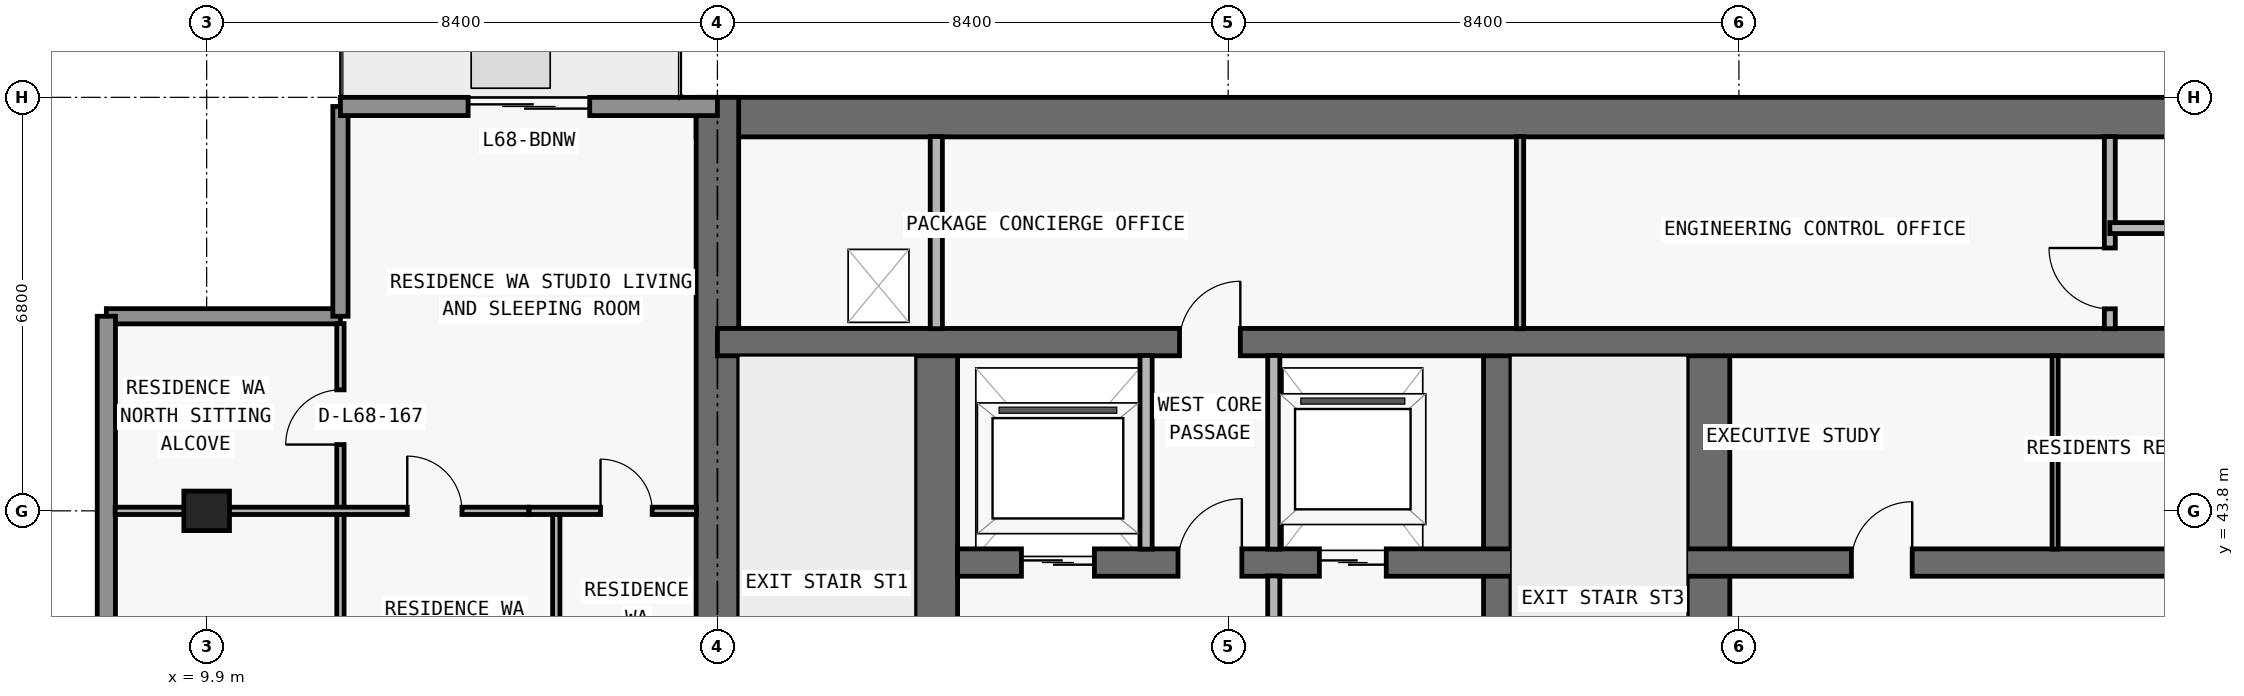
"""IFC4 building model, lengths in metres.
Left out: names, types, materials, properties, quantities, classifications, styles, units other than length and angle.
Written with IfcOpenShell. Run it as: python <this file> out.ifc"""

import sys

from ifc_helpers import new_model, si_unit, direction, frame, frame_2d, origin, origin_2d, place, context, subcontext, project, spatial, rectangle, extrude, element, fill, save


model = new_model("IFC4")
c1 = context("Model", 3, precision=1e-05, world=origin(), true_north=direction((0.0, 1.0)))
c2 = subcontext(c1, "Body", "Model", "MODEL_VIEW")
j1 = project(units=[si_unit("LENGTHUNIT", "METRE"), si_unit("PLANEANGLEUNIT", "RADIAN")], contexts=[c1])
p1 = place(None, origin())
s1 = spatial("IfcSite", under=j1, at=p1, CompositionType="ELEMENT")
p2 = place(p1, origin())
s2 = spatial("IfcBuilding", under=s1, at=p2, CompositionType="ELEMENT")
p3 = place(p2, frame((0.0, 0.0, 243.0)))
s3 = spatial("IfcBuildingStorey", under=s2, at=p3, CompositionType="ELEMENT", Elevation=243.0)
p4 = place(p3, frame((9.9, 43.8, 0.0), z_axis=(0.0, 0.0, 1.0), x_axis=(1.0, 0.0, 0.0)))
e1 = element("IfcColumn", 1, at=p4, inside=s3, PredefinedType="COLUMN", context=c2, shape_type="SweptSolid", body=[
    extrude(rectangle(XDim=0.75, YDim=0.65, at=origin_2d()), origin(), (0.0, 0.0, 1.0), 3.05),
])
p5 = place(p3, frame((17.95, 50.275, 0.0), z_axis=(0.0, 0.0, 1.0), x_axis=(1.0, 0.0, 0.0)))
e2 = element("IfcWall", 2, at=p5, inside=s3, PredefinedType="SHEAR", context=c2, shape_type="SweptSolid", body=[
    extrude(rectangle(XDim=41.9, YDim=0.65, at=frame_2d((20.95, 0.0))), origin(), (0.0, 0.0, 1.0), 3.05),
])
p6 = place(p3, frame((18.3, 36.65, 0.0), z_axis=(0.0, 0.0, 1.0), x_axis=(0.0, 1.0, 0.0)))
e3 = element("IfcWall", 3, at=p6, inside=s3, PredefinedType="SHEAR", context=c2, shape_type="SweptSolid", body=[
    extrude(rectangle(XDim=13.95, YDim=0.7, at=frame_2d((6.975, 0.0))), origin(), (0.0, 0.0, 1.0), 3.05),
])
p7 = place(p3, frame((21.9, 37.0, 0.0), z_axis=(0.0, 0.0, 1.0), x_axis=(0.0, 1.0, 0.0)))
e4 = element("IfcWall", 4, at=p7, inside=s3, PredefinedType="SHEAR", context=c2, shape_type="SweptSolid", body=[
    extrude(rectangle(XDim=9.575, YDim=0.7, at=frame_2d((4.788, 0.0))), origin(), (0.0, 0.0, 1.0), 3.05),
])
p8 = place(p7, frame((0.55, 0.0, 0.0)))
e5 = element("IfcOpeningElement", 5, at=p8, cuts=e4, PredefinedType="OPENING", context=c2, shape_type="SweptSolid", body=[
    extrude(rectangle(XDim=1.1, YDim=2.15, at=frame_2d((0.55, 1.075))), frame((0.0, 0.36, 0.0), z_axis=(0.0, -1.0, 0.0), x_axis=(1.0, 0.0, 0.0)), (0.0, 0.0, 1.0), 0.72),
])
p9 = place(p3, frame((31.125, 37.0, 0.0), z_axis=(0.0, 0.0, 1.0), x_axis=(0.0, 1.0, 0.0)))
e6 = element("IfcWall", 6, at=p9, inside=s3, PredefinedType="SHEAR", context=c2, shape_type="SweptSolid", body=[
    extrude(rectangle(XDim=9.575, YDim=0.45, at=frame_2d((4.788, 0.0))), origin(), (0.0, 0.0, 1.0), 3.05),
])
p10 = place(p3, frame((34.6, 37.0, 0.0), z_axis=(0.0, 0.0, 1.0), x_axis=(0.0, 1.0, 0.0)))
e7 = element("IfcWall", 7, at=p10, inside=s3, PredefinedType="SHEAR", context=c2, shape_type="SweptSolid", body=[
    extrude(rectangle(XDim=9.575, YDim=0.7, at=frame_2d((4.788, 0.0))), origin(), (0.0, 0.0, 1.0), 3.05),
])
p11 = place(p3, frame((22.25, 42.95, 0.0), z_axis=(0.0, 0.0, 1.0), x_axis=(1.0, 0.0, 0.0)))
e8 = element("IfcWall", 8, at=p11, inside=s3, PredefinedType="SHEAR", context=c2, shape_type="SweptSolid", body=[
    extrude(rectangle(XDim=33.3, YDim=0.45, at=frame_2d((16.65, 0.0))), origin(), (0.0, 0.0, 1.0), 3.05),
])
p12 = place(p11, frame((1.05, 0.0, 0.0)))
e9 = element("IfcOpeningElement", 9, at=p12, cuts=e8, PredefinedType="OPENING", context=c2, shape_type="SweptSolid", body=[
    extrude(rectangle(XDim=1.2, YDim=2.2, at=frame_2d((0.6, 1.1))), frame((0.0, 0.235, 0.0), z_axis=(0.0, -1.0, 0.0), x_axis=(1.0, 0.0, 0.0)), (0.0, 0.0, 1.0), 0.47),
])
p13 = place(p11, frame((31.05, 0.0, 0.0)))
e10 = element("IfcOpeningElement", 10, at=p13, cuts=e8, PredefinedType="OPENING", context=c2, shape_type="SweptSolid", body=[
    extrude(rectangle(XDim=1.2, YDim=2.2, at=frame_2d((0.6, 1.1))), frame((0.0, 0.235, 0.0), z_axis=(0.0, -1.0, 0.0), x_axis=(1.0, 0.0, 0.0)), (0.0, 0.0, 1.0), 0.47),
])
p14 = place(p11, frame((26.45, 0.0, 0.0)))
e11 = element("IfcOpeningElement", 11, at=p14, cuts=e8, PredefinedType="OPENING", context=c2, shape_type="SweptSolid", body=[
    extrude(rectangle(XDim=1.1, YDim=2.2, at=frame_2d((0.55, 1.1))), frame((0.0, 0.235, 0.0), z_axis=(0.0, -1.0, 0.0), x_axis=(1.0, 0.0, 0.0)), (0.0, 0.0, 1.0), 0.47),
])
p15 = place(p11, frame((5.95, 0.0, 0.0)))
e12 = element("IfcOpeningElement", 12, at=p15, cuts=e8, PredefinedType="OPENING", context=c2, shape_type="SweptSolid", body=[
    extrude(rectangle(XDim=1.1, YDim=2.2, at=frame_2d((0.55, 1.1))), frame((0.0, 0.235, 0.0), z_axis=(0.0, -1.0, 0.0), x_axis=(1.0, 0.0, 0.0)), (0.0, 0.0, 1.0), 0.47),
])
p16 = place(p11, frame((3.625, 0.0, 0.0)))
e13 = element("IfcOpeningElement", 13, at=p16, cuts=e8, PredefinedType="OPENING", context=c2, shape_type="SweptSolid", body=[
    extrude(rectangle(XDim=1.05, YDim=2.15, at=frame_2d((0.525, 1.075))), frame((0.0, 0.235, 0.0), z_axis=(0.0, -1.0, 0.0), x_axis=(1.0, 0.0, 0.0)), (0.0, 0.0, 1.0), 0.47),
])
p17 = place(p11, frame((28.675, 0.0, 0.0)))
e14 = element("IfcOpeningElement", 14, at=p17, cuts=e8, PredefinedType="OPENING", context=c2, shape_type="SweptSolid", body=[
    extrude(rectangle(XDim=1.05, YDim=2.15, at=frame_2d((0.525, 1.075))), frame((0.0, 0.235, 0.0), z_axis=(0.0, -1.0, 0.0), x_axis=(1.0, 0.0, 0.0)), (0.0, 0.0, 1.0), 0.47),
])
p18 = place(p11, frame((14.7, 0.0, 0.0)))
e15 = element("IfcOpeningElement", 15, at=p18, cuts=e8, PredefinedType="OPENING", context=c2, shape_type="SweptSolid", body=[
    extrude(rectangle(XDim=1.0, YDim=2.2, at=frame_2d((0.5, 1.1))), frame((0.0, 0.235, 0.0), z_axis=(0.0, -1.0, 0.0), x_axis=(1.0, 0.0, 0.0)), (0.0, 0.0, 1.0), 0.47),
])
p19 = place(p11, frame((21.45, 0.0, 0.0)))
e16 = element("IfcOpeningElement", 16, at=p19, cuts=e8, PredefinedType="OPENING", context=c2, shape_type="SweptSolid", body=[
    extrude(rectangle(XDim=1.0, YDim=2.2, at=frame_2d((0.5, 1.1))), frame((0.0, 0.235, 0.0), z_axis=(0.0, -1.0, 0.0), x_axis=(1.0, 0.0, 0.0)), (0.0, 0.0, 1.0), 0.47),
])
p20 = place(p3, frame((18.3, 46.575, 0.0), z_axis=(0.0, 0.0, 1.0), x_axis=(1.0, 0.0, 0.0)))
e17 = element("IfcWall", 17, at=p20, inside=s3, PredefinedType="SHEAR", context=c2, shape_type="SweptSolid", body=[
    extrude(rectangle(XDim=41.2, YDim=0.45, at=frame_2d((20.6, 0.0))), origin(), (0.0, 0.0, 1.0), 3.05),
])
p21 = place(p20, frame((7.6, 0.0, 0.0)))
e18 = element("IfcOpeningElement", 18, at=p21, cuts=e17, PredefinedType="OPENING", context=c2, shape_type="SweptSolid", body=[
    extrude(rectangle(XDim=1.0, YDim=2.2, at=frame_2d((0.5, 1.1))), frame((0.0, 0.235, 0.0), z_axis=(0.0, -1.0, 0.0), x_axis=(1.0, 0.0, 0.0)), (0.0, 0.0, 1.0), 0.47),
])
p22 = place(p20, frame((32.625, 0.0, 0.0)))
e19 = element("IfcOpeningElement", 19, at=p22, cuts=e17, PredefinedType="OPENING", context=c2, shape_type="SweptSolid", body=[
    extrude(rectangle(XDim=1.05, YDim=2.15, at=frame_2d((0.525, 1.075))), frame((0.0, 0.235, 0.0), z_axis=(0.0, -1.0, 0.0), x_axis=(1.0, 0.0, 0.0)), (0.0, 0.0, 1.0), 0.47),
])
p23 = place(p3, frame((8.25, 47.0, 0.0), z_axis=(0.0, 0.0, 1.0), x_axis=(1.0, 0.0, 0.0)))
e20 = element("IfcWall", 20, at=p23, inside=s3, PredefinedType="ELEMENTEDWALL", context=c2, shape_type="SweptSolid", body=[
    extrude(rectangle(XDim=3.85, YDim=0.25, at=frame_2d((1.925, 0.0))), origin(), (0.0, 0.0, 1.0), 3.05),
])
p24 = place(p3, frame((12.1, 47.0, 0.0), z_axis=(0.0, 0.0, 1.0), x_axis=(0.0, 1.0, 0.0)))
e21 = element("IfcWall", 21, at=p24, inside=s3, PredefinedType="ELEMENTEDWALL", context=c2, shape_type="SweptSolid", body=[
    extrude(rectangle(XDim=3.45, YDim=0.25, at=frame_2d((1.725, 0.0))), origin(), (0.0, 0.0, 1.0), 3.05),
])
p25 = place(p3, frame((8.25, 30.15, 0.0), z_axis=(0.0, 0.0, 1.0), x_axis=(0.0, 1.0, 0.0)))
e22 = element("IfcWall", 22, at=p25, inside=s3, PredefinedType="STANDARD", context=c2, shape_type="SweptSolid", body=[
    extrude(rectangle(XDim=16.85, YDim=0.3, at=frame_2d((8.425, 0.0))), origin(), (0.0, 0.0, 1.0), 3.05),
])
p26 = place(p3, frame((12.1, 50.45, 0.0), z_axis=(0.0, 0.0, 1.0), x_axis=(1.0, 0.0, 0.0)))
e23 = element("IfcWall", 23, at=p26, inside=s3, PredefinedType="STANDARD", context=c2, shape_type="SweptSolid", body=[
    extrude(rectangle(XDim=6.2, YDim=0.3, at=frame_2d((3.1, 0.0))), origin(), (0.0, 0.0, 1.0), 3.05),
])
p27 = place(p26, frame((2.1, 0.0, 0.0)))
e24 = element("IfcOpeningElement", 24, at=p27, cuts=e23, PredefinedType="OPENING", context=c2, shape_type="SweptSolid", body=[
    extrude(rectangle(XDim=2.0, YDim=2.3, at=frame_2d((1.0, 1.15))), frame((0.0, 0.16, 0.0), z_axis=(0.0, -1.0, 0.0), x_axis=(1.0, 0.0, 0.0)), (0.0, 0.0, 1.0), 0.32),
])
p28 = place(p3, frame((12.1, 37.005, 0.0), z_axis=(0.0, 0.0, 1.0), x_axis=(0.0, 1.0, 0.0)))
e25 = element("IfcWall", 25, at=p28, inside=s3, PredefinedType="PARTITIONING", context=c2, shape_type="SweptSolid", body=[
    extrude(rectangle(XDim=9.875, YDim=0.12, at=frame_2d((4.938, 0.0))), origin(), (0.0, 0.0, 1.0), 3.05),
])
p29 = place(p28, frame((2.948, 0.0, 0.0)))
e26 = element("IfcOpeningElement", 26, at=p29, cuts=e25, PredefinedType="OPENING", context=c2, shape_type="SweptSolid", body=[
    extrude(rectangle(XDim=0.9, YDim=2.15, at=frame_2d((0.45, 1.075))), frame((0.0, 0.07, 0.0), z_axis=(0.0, -1.0, 0.0), x_axis=(1.0, 0.0, 0.0)), (0.0, 0.0, 1.0), 0.14),
])
p30 = place(p28, frame((7.885, 0.0, 0.0)))
e27 = element("IfcOpeningElement", 27, at=p30, cuts=e25, PredefinedType="OPENING", context=c2, shape_type="SweptSolid", body=[
    extrude(rectangle(XDim=0.9, YDim=2.15, at=frame_2d((0.45, 1.075))), frame((0.0, 0.07, 0.0), z_axis=(0.0, -1.0, 0.0), x_axis=(1.0, 0.0, 0.0)), (0.0, 0.0, 1.0), 0.14),
])
p31 = place(p3, frame((15.65, 37.0, 0.0), z_axis=(0.0, 0.0, 1.0), x_axis=(0.0, 1.0, 0.0)))
e28 = element("IfcWall", 28, at=p31, inside=s3, PredefinedType="PARTITIONING", context=c2, shape_type="SweptSolid", body=[
    extrude(rectangle(XDim=6.8, YDim=0.12, at=frame_2d((3.4, 0.0))), origin(), (0.0, 0.0, 1.0), 2.725),
])
p32 = place(p31, frame((1.207, 0.0, 0.0)))
e29 = element("IfcOpeningElement", 29, at=p32, cuts=e28, PredefinedType="OPENING", context=c2, shape_type="SweptSolid", body=[
    extrude(rectangle(XDim=0.85, YDim=2.1, at=frame_2d((0.425, 1.05))), frame((0.0, 0.07, 0.0), z_axis=(0.0, -1.0, 0.0), x_axis=(1.0, 0.0, 0.0)), (0.0, 0.0, 1.0), 0.14),
])
p33 = place(p3, frame((21.9, 46.795, 0.0), z_axis=(0.0, 0.0, 1.0), x_axis=(0.0, 1.0, 0.0)))
e30 = element("IfcWall", 30, at=p33, inside=s3, PredefinedType="PARTITIONING", context=c2, shape_type="SweptSolid", body=[
    extrude(rectangle(XDim=3.16, YDim=0.2, at=frame_2d((1.58, 0.0))), origin(), (0.0, 0.0, 1.0), 3.05),
])
p34 = place(p3, frame((25.35, 43.17, 0.0), z_axis=(0.0, 0.0, 1.0), x_axis=(0.0, 1.0, 0.0)))
e31 = element("IfcWall", 31, at=p34, inside=s3, PredefinedType="PARTITIONING", context=c2, shape_type="SweptSolid", body=[
    extrude(rectangle(XDim=3.185, YDim=0.2, at=frame_2d((1.593, 0.0))), origin(), (0.0, 0.0, 1.0), 3.05),
])
p35 = place(p3, frame((27.45, 37.345, 0.0), z_axis=(0.0, 0.0, 1.0), x_axis=(0.0, 1.0, 0.0)))
e32 = element("IfcWall", 32, at=p35, inside=s3, PredefinedType="PARTITIONING", context=c2, shape_type="SweptSolid", body=[
    extrude(rectangle(XDim=5.385, YDim=0.2, at=frame_2d((2.692, 0.0))), origin(), (0.0, 0.0, 1.0), 3.05),
])
p36 = place(p3, frame((27.45, 43.17, 0.0), z_axis=(0.0, 0.0, 1.0), x_axis=(0.0, 1.0, 0.0)))
e33 = element("IfcWall", 33, at=p36, inside=s3, PredefinedType="PARTITIONING", context=c2, shape_type="SweptSolid", body=[
    extrude(rectangle(XDim=3.185, YDim=0.2, at=frame_2d((1.593, 0.0))), origin(), (0.0, 0.0, 1.0), 3.05),
])
p37 = place(p3, frame((31.5, 46.795, 0.0), z_axis=(0.0, 0.0, 1.0), x_axis=(0.0, 1.0, 0.0)))
e34 = element("IfcWall", 34, at=p37, inside=s3, PredefinedType="PARTITIONING", context=c2, shape_type="SweptSolid", body=[
    extrude(rectangle(XDim=3.16, YDim=0.12, at=frame_2d((1.58, 0.0))), origin(), (0.0, 0.0, 1.0), 3.05),
])
p38 = place(p3, frame((40.3, 43.17, 0.0), z_axis=(0.0, 0.0, 1.0), x_axis=(0.0, 1.0, 0.0)))
e35 = element("IfcWall", 35, at=p38, inside=s3, PredefinedType="MOVABLE", context=c2, shape_type="SweptSolid", body=[
    extrude(rectangle(XDim=3.185, YDim=0.1, at=frame_2d((1.593, 0.0))), origin(), (0.0, 0.0, 1.0), 3.05),
])
p39 = place(p3, frame((41.2, 46.795, 0.0), z_axis=(0.0, 0.0, 1.0), x_axis=(0.0, 1.0, 0.0)))
e36 = element("IfcWall", 36, at=p39, inside=s3, PredefinedType="PARTITIONING", context=c2, shape_type="SweptSolid", body=[
    extrude(rectangle(XDim=3.16, YDim=0.18, at=frame_2d((1.58, 0.0))), origin(), (0.0, 0.0, 1.0), 3.05),
])
p40 = place(p39, frame((0.327, 0.0, 0.0)))
e37 = element("IfcOpeningElement", 37, at=p40, cuts=e36, PredefinedType="OPENING", context=c2, shape_type="SweptSolid", body=[
    extrude(rectangle(XDim=1.0, YDim=2.2, at=frame_2d((0.5, 1.1))), frame((0.0, 0.1, 0.0), z_axis=(0.0, -1.0, 0.0), x_axis=(1.0, 0.0, 0.0)), (0.0, 0.0, 1.0), 0.2),
])
p41 = place(p3, frame((8.395, 43.8, 0.0), z_axis=(0.0, 0.0, 1.0), x_axis=(1.0, 0.0, 0.0)))
e38 = element("IfcWall", 38, at=p41, inside=s3, PredefinedType="PARTITIONING", context=c2, shape_type="SweptSolid", body=[
    extrude(rectangle(XDim=6.803, YDim=0.12, at=frame_2d((3.401, 0.0))), origin(), (0.0, 0.0, 1.0), 2.418),
])
p42 = place(p41, frame((4.804, 0.0, 0.0)))
e39 = element("IfcOpeningElement", 39, at=p42, cuts=e38, PredefinedType="OPENING", context=c2, shape_type="SweptSolid", body=[
    extrude(rectangle(XDim=0.9, YDim=2.15, at=frame_2d((0.45, 1.075))), frame((0.0, 0.07, 0.0), z_axis=(0.0, -1.0, 0.0), x_axis=(1.0, 0.0, 0.0)), (0.0, 0.0, 1.0), 0.14),
])
p43 = place(p3, frame((15.203, 43.8, 0.0), z_axis=(0.0, 0.0, 1.0), x_axis=(1.0, 0.0, 0.0)))
e40 = element("IfcWall", 40, at=p43, inside=s3, PredefinedType="PARTITIONING", context=c2, shape_type="SweptSolid", body=[
    extrude(rectangle(XDim=2.752, YDim=0.12, at=frame_2d((1.376, 0.0))), origin(), (0.0, 0.0, 1.0), 2.418),
])
p44 = place(p43, frame((1.175, 0.0, 0.0)))
e41 = element("IfcOpeningElement", 41, at=p44, cuts=e40, PredefinedType="OPENING", context=c2, shape_type="SweptSolid", body=[
    extrude(rectangle(XDim=0.85, YDim=2.1, at=frame_2d((0.425, 1.05))), frame((0.0, 0.07, 0.0), z_axis=(0.0, -1.0, 0.0), x_axis=(1.0, 0.0, 0.0)), (0.0, 0.0, 1.0), 0.14),
])
p45 = place(p3, frame((41.2, 48.45, 0.0), z_axis=(0.0, 0.0, 1.0), x_axis=(1.0, 0.0, 0.0)))
e42 = element("IfcWall", 42, at=p45, inside=s3, PredefinedType="PARTITIONING", context=c2, shape_type="SweptSolid", body=[
    extrude(rectangle(XDim=14.7, YDim=0.18, at=frame_2d((7.35, 0.0))), origin(), (0.0, 0.0, 1.0), 3.05),
])
p46 = place(p45, frame((1.85, 0.0, 0.0)))
e43 = element("IfcOpeningElement", 43, at=p46, cuts=e42, PredefinedType="OPENING", context=c2, shape_type="SweptSolid", body=[
    extrude(rectangle(XDim=1.2, YDim=2.2, at=frame_2d((0.6, 1.1))), frame((0.0, 0.1, 0.0), z_axis=(0.0, -1.0, 0.0), x_axis=(1.0, 0.0, 0.0)), (0.0, 0.0, 1.0), 0.2),
])
p47 = place(p45, frame((6.75, 0.0, 0.0)))
e44 = element("IfcOpeningElement", 44, at=p47, cuts=e42, PredefinedType="OPENING", context=c2, shape_type="SweptSolid", body=[
    extrude(rectangle(XDim=1.2, YDim=2.2, at=frame_2d((0.6, 1.1))), frame((0.0, 0.1, 0.0), z_axis=(0.0, -1.0, 0.0), x_axis=(1.0, 0.0, 0.0)), (0.0, 0.0, 1.0), 0.2),
])
p48 = place(p45, frame((11.825, 0.0, 0.0)))
e45 = element("IfcOpeningElement", 45, at=p48, cuts=e42, PredefinedType="OPENING", context=c2, shape_type="SweptSolid", body=[
    extrude(rectangle(XDim=0.85, YDim=2.1, at=frame_2d((0.425, 1.05))), frame((0.0, 0.1, 0.0), z_axis=(0.0, -1.0, 0.0), x_axis=(1.0, 0.0, 0.0)), (0.0, 0.0, 1.0), 0.2),
])
p49 = place(p27, origin())
e46 = element("IfcDoor", 46, at=p49, inside=s3, OperationType="DOUBLE_DOOR_SLIDING", PredefinedType="DOOR", context=c2, shape_type="SweptSolid", body=[
    extrude(rectangle(XDim=2.0, YDim=2.3, at=frame_2d((1.0, 1.15))), frame((0.0, 0.025, 0.0), z_axis=(0.0, -1.0, 0.0), x_axis=(1.0, 0.0, 0.0)), (0.0, 0.0, 1.0), 0.05),
])
fill(e24, e46)
p50 = place(p12, origin())
e47 = element("IfcDoor", 47, at=p50, inside=s3, OperationType="DOUBLE_DOOR_SLIDING", PredefinedType="DOOR", context=c2, shape_type="SweptSolid", body=[
    extrude(rectangle(XDim=1.2, YDim=2.2, at=frame_2d((0.6, 1.1))), frame((0.0, 0.025, 0.0), z_axis=(0.0, -1.0, 0.0), x_axis=(1.0, 0.0, 0.0)), (0.0, 0.0, 1.0), 0.05),
])
fill(e9, e47)
p51 = place(p15, origin())
e48 = element("IfcDoor", 48, at=p51, inside=s3, OperationType="DOUBLE_DOOR_SLIDING", PredefinedType="DOOR", context=c2, shape_type="SweptSolid", body=[
    extrude(rectangle(XDim=1.1, YDim=2.2, at=frame_2d((0.55, 1.1))), frame((0.0, 0.025, 0.0), z_axis=(0.0, -1.0, 0.0), x_axis=(1.0, 0.0, 0.0)), (0.0, 0.0, 1.0), 0.05),
])
fill(e12, e48)
p52 = place(p16, origin())
e49 = element("IfcDoor", 49, at=p52, inside=s3, OperationType="SINGLE_SWING_RIGHT", PredefinedType="DOOR", context=c2, shape_type="SweptSolid", body=[
    extrude(rectangle(XDim=1.05, YDim=2.15, at=frame_2d((0.525, 1.075))), frame((0.0, 0.025, 0.0), z_axis=(0.0, -1.0, 0.0), x_axis=(1.0, 0.0, 0.0)), (0.0, 0.0, 1.0), 0.05),
])
fill(e13, e49)
p53 = place(p18, origin())
e50 = element("IfcDoor", 50, at=p53, inside=s3, OperationType="SINGLE_SWING_RIGHT", PredefinedType="DOOR", context=c2, shape_type="SweptSolid", body=[
    extrude(rectangle(XDim=1.0, YDim=2.2, at=frame_2d((0.5, 1.1))), frame((0.0, 0.025, 0.0), z_axis=(0.0, -1.0, 0.0), x_axis=(1.0, 0.0, 0.0)), (0.0, 0.0, 1.0), 0.05),
])
fill(e15, e50)
p54 = place(p21, origin())
e51 = element("IfcDoor", 51, at=p54, inside=s3, OperationType="SINGLE_SWING_RIGHT", PredefinedType="DOOR", context=c2, shape_type="SweptSolid", body=[
    extrude(rectangle(XDim=1.0, YDim=2.2, at=frame_2d((0.5, 1.1))), frame((0.0, 0.025, 0.0), z_axis=(0.0, -1.0, 0.0), x_axis=(1.0, 0.0, 0.0)), (0.0, 0.0, 1.0), 0.05),
])
fill(e18, e51)
p55 = place(p40, origin())
e52 = element("IfcDoor", 52, at=p55, inside=s3, OperationType="SINGLE_SWING_RIGHT", PredefinedType="DOOR", context=c2, shape_type="SweptSolid", body=[
    extrude(rectangle(XDim=1.0, YDim=2.2, at=frame_2d((0.5, 1.1))), frame((0.0, 0.025, 0.0), z_axis=(0.0, -1.0, 0.0), x_axis=(1.0, 0.0, 0.0)), (0.0, 0.0, 1.0), 0.05),
])
fill(e37, e52)
p56 = place(p42, origin())
e53 = element("IfcDoor", 53, at=p56, inside=s3, OperationType="SINGLE_SWING_LEFT", PredefinedType="DOOR", context=c2, shape_type="SweptSolid", body=[
    extrude(rectangle(XDim=0.9, YDim=2.15, at=frame_2d((0.45, 1.075))), frame((0.0, 0.025, 0.0), z_axis=(0.0, -1.0, 0.0), x_axis=(1.0, 0.0, 0.0)), (0.0, 0.0, 1.0), 0.05),
])
fill(e39, e53)
p57 = place(p44, origin())
e54 = element("IfcDoor", 54, at=p57, inside=s3, OperationType="SINGLE_SWING_LEFT", PredefinedType="DOOR", context=c2, shape_type="SweptSolid", body=[
    extrude(rectangle(XDim=0.85, YDim=2.1, at=frame_2d((0.425, 1.05))), frame((0.0, 0.025, 0.0), z_axis=(0.0, -1.0, 0.0), x_axis=(1.0, 0.0, 0.0)), (0.0, 0.0, 1.0), 0.05),
])
fill(e41, e54)
p58 = place(p30, origin())
e55 = element("IfcDoor", 55, at=p58, inside=s3, OperationType="SINGLE_SWING_LEFT", PredefinedType="DOOR", context=c2, shape_type="SweptSolid", body=[
    extrude(rectangle(XDim=0.9, YDim=2.15, at=frame_2d((0.45, 1.075))), frame((0.0, 0.025, 0.0), z_axis=(0.0, -1.0, 0.0), x_axis=(1.0, 0.0, 0.0)), (0.0, 0.0, 1.0), 0.05),
])
fill(e27, e55)
save(model, sys.argv[1])
